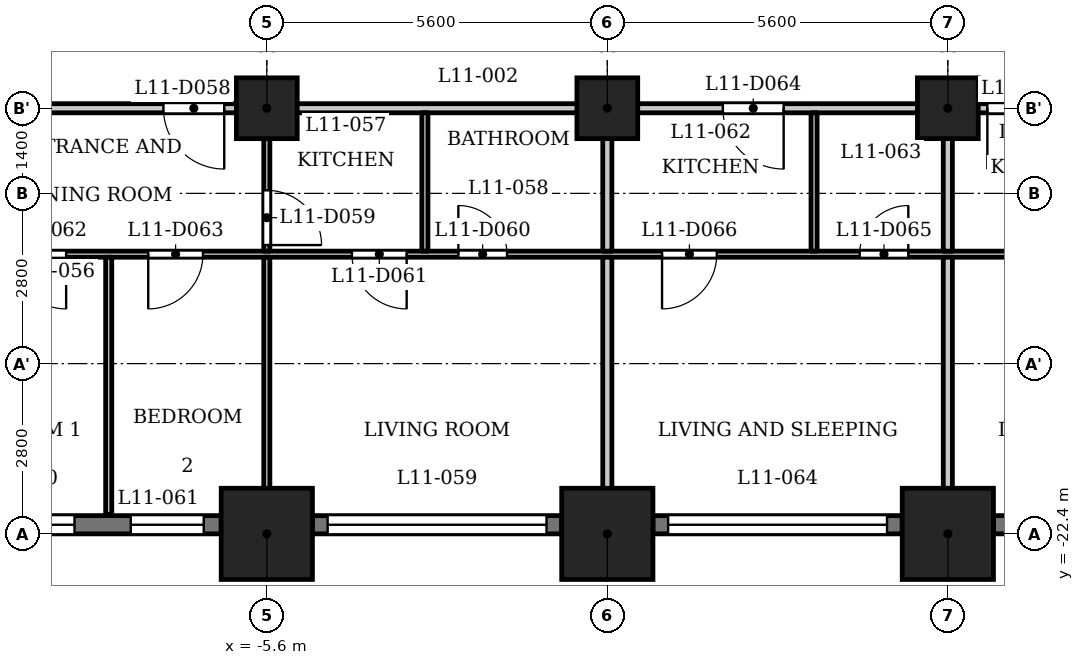
"""IFC4 building model, lengths in metres.
Left out: names, types, materials, properties, quantities, classifications, styles, units other than length and angle.
Written with IfcOpenShell. Run it as: python <this file> out.ifc"""

import sys

from ifc_helpers import new_model, si_unit, direction, frame, frame_2d, origin, origin_2d, place, context, subcontext, project, spatial, rectangle, extrude, element, fill, save


model = new_model("IFC4")
c1 = context("Model", 3, precision=1e-05, world=origin(), true_north=direction((0.0, 1.0)))
c2 = subcontext(c1, "Body", "Model", "MODEL_VIEW")
j1 = project(units=[si_unit("LENGTHUNIT", "METRE"), si_unit("PLANEANGLEUNIT", "RADIAN")], contexts=[c1])
p1 = place(None, origin())
s1 = spatial("IfcSite", under=j1, at=p1, CompositionType="ELEMENT")
p2 = place(p1, origin())
s2 = spatial("IfcBuilding", under=s1, at=p2, CompositionType="ELEMENT")
p3 = place(p2, frame((0.0, 0.0, 48.0)))
s3 = spatial("IfcBuildingStorey", under=s2, at=p3, CompositionType="ELEMENT", Elevation=48.0)
for number, where, z_axis, x_axis in (
    (1, (-5.6, -22.4, 0.0), (0.0, 0.0, 1.0), (1.0, 0.0, 0.0)),
    (2, (0.0, -22.4, 0.0), (0.0, 0.0, 1.0), (1.0, 0.0, 0.0)),
    (3, (5.6, -22.4, 0.0), (0.0, 0.0, 1.0), (1.0, 0.0, 0.0)),
):
    element("IfcColumn", number, at=place(p3, frame(where, z_axis=z_axis, x_axis=x_axis)), inside=s3, PredefinedType="COLUMN", context=c2, shape_type="SweptSolid", body=[
        extrude(rectangle(XDim=1.5, YDim=1.5, at=origin_2d()), origin(), (0.0, 0.0, 1.0), 3.5),
    ])
for number, where, z_axis, x_axis in (
    (4, (-5.6, -15.4, 0.0), (0.0, 0.0, 1.0), (1.0, 0.0, 0.0)),
    (5, (0.0, -15.4, 0.0), (0.0, 0.0, 1.0), (1.0, 0.0, 0.0)),
    (6, (5.6, -15.4, 0.0), (0.0, 0.0, 1.0), (1.0, 0.0, 0.0)),
):
    element("IfcColumn", number, at=place(p3, frame(where, z_axis=z_axis, x_axis=x_axis)), inside=s3, PredefinedType="COLUMN", context=c2, shape_type="SweptSolid", body=[
        extrude(rectangle(XDim=1.0, YDim=1.0, at=origin_2d()), origin(), (0.0, 0.0, 1.0), 3.5),
    ])
p4 = place(p3, frame((-10.45, -22.25, 0.0), z_axis=(0.0, 0.0, 1.0), x_axis=(1.0, 0.0, 0.0)))
e7 = element("IfcWall", 7, at=p4, inside=s3, PredefinedType="SOLIDWALL", context=c2, shape_type="SweptSolid", body=[
    extrude(rectangle(XDim=4.1, YDim=0.3, at=frame_2d((2.05, 0.0))), origin(), (0.0, 0.0, 1.0), 2.35),
])
p5 = place(p4, frame((0.488, 0.0, 0.6)))
e8 = element("IfcOpeningElement", 8, at=p5, cuts=e7, PredefinedType="OPENING", context=c2, shape_type="SweptSolid", body=[
    extrude(rectangle(XDim=1.2, YDim=1.55, at=frame_2d((0.6, 0.775))), frame((0.0, 0.16, 0.0), z_axis=(0.0, -1.0, 0.0), x_axis=(1.0, 0.0, 0.0)), (0.0, 0.0, 1.0), 0.32),
])
p6 = place(p4, frame((2.613, 0.0, 0.6)))
e9 = element("IfcOpeningElement", 9, at=p6, cuts=e7, PredefinedType="OPENING", context=c2, shape_type="SweptSolid", body=[
    extrude(rectangle(XDim=1.2, YDim=1.55, at=frame_2d((0.6, 0.775))), frame((0.0, 0.16, 0.0), z_axis=(0.0, -1.0, 0.0), x_axis=(1.0, 0.0, 0.0)), (0.0, 0.0, 1.0), 0.32),
])
p7 = place(p3, frame((-4.85, -22.25, 0.0), z_axis=(0.0, 0.0, 1.0), x_axis=(1.0, 0.0, 0.0)))
e10 = element("IfcWall", 10, at=p7, inside=s3, PredefinedType="SOLIDWALL", context=c2, shape_type="SweptSolid", body=[
    extrude(rectangle(XDim=4.1, YDim=0.3, at=frame_2d((2.05, 0.0))), origin(), (0.0, 0.0, 1.0), 2.35),
])
p8 = place(p7, frame((0.25, 0.0, 1.2)))
e11 = element("IfcOpeningElement", 11, at=p8, cuts=e10, PredefinedType="OPENING", context=c2, shape_type="SweptSolid", body=[
    extrude(rectangle(XDim=3.6, YDim=0.95, at=frame_2d((1.8, 0.475))), frame((0.0, 0.16, 0.0), z_axis=(0.0, -1.0, 0.0), x_axis=(1.0, 0.0, 0.0)), (0.0, 0.0, 1.0), 0.32),
])
p9 = place(p3, frame((0.75, -22.25, 0.0), z_axis=(0.0, 0.0, 1.0), x_axis=(1.0, 0.0, 0.0)))
e12 = element("IfcWall", 12, at=p9, inside=s3, PredefinedType="SOLIDWALL", context=c2, shape_type="SweptSolid", body=[
    extrude(rectangle(XDim=4.1, YDim=0.3, at=frame_2d((2.05, 0.0))), origin(), (0.0, 0.0, 1.0), 2.35),
])
p10 = place(p9, frame((0.25, 0.0, 1.2)))
e13 = element("IfcOpeningElement", 13, at=p10, cuts=e12, PredefinedType="OPENING", context=c2, shape_type="SweptSolid", body=[
    extrude(rectangle(XDim=3.6, YDim=0.95, at=frame_2d((1.8, 0.475))), frame((0.0, 0.16, 0.0), z_axis=(0.0, -1.0, 0.0), x_axis=(1.0, 0.0, 0.0)), (0.0, 0.0, 1.0), 0.32),
])
p11 = place(p3, frame((6.35, -22.25, 0.0), z_axis=(0.0, 0.0, 1.0), x_axis=(1.0, 0.0, 0.0)))
e14 = element("IfcWall", 14, at=p11, inside=s3, PredefinedType="SOLIDWALL", context=c2, shape_type="SweptSolid", body=[
    extrude(rectangle(XDim=4.1, YDim=0.3, at=frame_2d((2.05, 0.0))), origin(), (0.0, 0.0, 1.0), 2.35),
])
p12 = place(p11, frame((0.75, 0.0, 0.9)))
e15 = element("IfcOpeningElement", 15, at=p12, cuts=e14, PredefinedType="OPENING", context=c2, shape_type="SweptSolid", body=[
    extrude(rectangle(XDim=2.6, YDim=1.25, at=frame_2d((1.3, 0.625))), frame((0.0, 0.16, 0.0), z_axis=(0.0, -1.0, 0.0), x_axis=(1.0, 0.0, 0.0)), (0.0, 0.0, 1.0), 0.32),
])
p13 = place(p3, frame((-26.394, -17.8, 0.0), z_axis=(0.0, 0.0, 1.0), x_axis=(1.0, 0.0, 0.0)))
e16 = element("IfcWall", 16, at=p13, inside=s3, PredefinedType="PARTITIONING", context=c2, shape_type="SweptSolid", body=[
    extrude(rectangle(XDim=53.126, YDim=0.1, at=frame_2d((26.563, 0.0))), origin(), (0.0, 0.0, 1.0), 3.2),
])
p14 = place(p13, frame((0.794, 0.0, 0.0)))
e17 = element("IfcOpeningElement", 17, at=p14, cuts=e16, PredefinedType="OPENING", context=c2, shape_type="SweptSolid", body=[
    extrude(rectangle(XDim=0.8, YDim=2.1, at=frame_2d((0.4, 1.05))), frame((0.0, 0.06, 0.0), z_axis=(0.0, -1.0, 0.0), x_axis=(1.0, 0.0, 0.0)), (0.0, 0.0, 1.0), 0.12),
])
p15 = place(p13, frame((5.644, 0.0, 0.0)))
e18 = element("IfcOpeningElement", 18, at=p15, cuts=e16, PredefinedType="OPENING", context=c2, shape_type="SweptSolid", body=[
    extrude(rectangle(XDim=0.9, YDim=2.1, at=frame_2d((0.45, 1.05))), frame((0.0, 0.06, 0.0), z_axis=(0.0, -1.0, 0.0), x_axis=(1.0, 0.0, 0.0)), (0.0, 0.0, 1.0), 0.12),
])
p16 = place(p13, frame((10.394, 0.0, 0.0)))
e19 = element("IfcOpeningElement", 19, at=p16, cuts=e16, PredefinedType="OPENING", context=c2, shape_type="SweptSolid", body=[
    extrude(rectangle(XDim=0.8, YDim=2.1, at=frame_2d((0.4, 1.05))), frame((0.0, 0.06, 0.0), z_axis=(0.0, -1.0, 0.0), x_axis=(1.0, 0.0, 0.0)), (0.0, 0.0, 1.0), 0.12),
])
p17 = place(p13, frame((13.244, 0.0, 0.0)))
e20 = element("IfcOpeningElement", 20, at=p17, cuts=e16, PredefinedType="OPENING", context=c2, shape_type="SweptSolid", body=[
    extrude(rectangle(XDim=0.9, YDim=2.1, at=frame_2d((0.45, 1.05))), frame((0.0, 0.06, 0.0), z_axis=(0.0, -1.0, 0.0), x_axis=(1.0, 0.0, 0.0)), (0.0, 0.0, 1.0), 0.12),
])
p18 = place(p13, frame((23.944, 0.0, 0.0)))
e21 = element("IfcOpeningElement", 21, at=p18, cuts=e16, PredefinedType="OPENING", context=c2, shape_type="SweptSolid", body=[
    extrude(rectangle(XDim=0.8, YDim=2.1, at=frame_2d((0.4, 1.05))), frame((0.0, 0.06, 0.0), z_axis=(0.0, -1.0, 0.0), x_axis=(1.0, 0.0, 0.0)), (0.0, 0.0, 1.0), 0.12),
])
p19 = place(p13, frame((22.194, 0.0, 0.0)))
e22 = element("IfcOpeningElement", 22, at=p19, cuts=e16, PredefinedType="OPENING", context=c2, shape_type="SweptSolid", body=[
    extrude(rectangle(XDim=0.9, YDim=2.1, at=frame_2d((0.45, 1.05))), frame((0.0, 0.06, 0.0), z_axis=(0.0, -1.0, 0.0), x_axis=(1.0, 0.0, 0.0)), (0.0, 0.0, 1.0), 0.12),
])
p20 = place(p13, frame((16.594, 0.0, 0.0)))
e23 = element("IfcOpeningElement", 23, at=p20, cuts=e16, PredefinedType="OPENING", context=c2, shape_type="SweptSolid", body=[
    extrude(rectangle(XDim=0.9, YDim=2.1, at=frame_2d((0.45, 1.05))), frame((0.0, 0.06, 0.0), z_axis=(0.0, -1.0, 0.0), x_axis=(1.0, 0.0, 0.0)), (0.0, 0.0, 1.0), 0.12),
])
p21 = place(p13, frame((18.844, 0.0, 0.0)))
e24 = element("IfcOpeningElement", 24, at=p21, cuts=e16, PredefinedType="OPENING", context=c2, shape_type="SweptSolid", body=[
    extrude(rectangle(XDim=0.9, YDim=2.1, at=frame_2d((0.45, 1.05))), frame((0.0, 0.06, 0.0), z_axis=(0.0, -1.0, 0.0), x_axis=(1.0, 0.0, 0.0)), (0.0, 0.0, 1.0), 0.12),
])
p22 = place(p13, frame((30.544, 0.0, 0.0)))
e25 = element("IfcOpeningElement", 25, at=p22, cuts=e16, PredefinedType="OPENING", context=c2, shape_type="SweptSolid", body=[
    extrude(rectangle(XDim=0.8, YDim=2.1, at=frame_2d((0.4, 1.05))), frame((0.0, 0.06, 0.0), z_axis=(0.0, -1.0, 0.0), x_axis=(1.0, 0.0, 0.0)), (0.0, 0.0, 1.0), 0.12),
])
p23 = place(p13, frame((27.294, 0.0, 0.0)))
e26 = element("IfcOpeningElement", 26, at=p23, cuts=e16, PredefinedType="OPENING", context=c2, shape_type="SweptSolid", body=[
    extrude(rectangle(XDim=0.9, YDim=2.1, at=frame_2d((0.45, 1.05))), frame((0.0, 0.06, 0.0), z_axis=(0.0, -1.0, 0.0), x_axis=(1.0, 0.0, 0.0)), (0.0, 0.0, 1.0), 0.12),
])
p24 = place(p13, frame((35.894, 0.0, 0.0)))
e27 = element("IfcOpeningElement", 27, at=p24, cuts=e16, PredefinedType="OPENING", context=c2, shape_type="SweptSolid", body=[
    extrude(rectangle(XDim=0.8, YDim=2.1, at=frame_2d((0.4, 1.05))), frame((0.0, 0.06, 0.0), z_axis=(0.0, -1.0, 0.0), x_axis=(1.0, 0.0, 0.0)), (0.0, 0.0, 1.0), 0.12),
])
p25 = place(p13, frame((33.644, 0.0, 0.0)))
e28 = element("IfcOpeningElement", 28, at=p25, cuts=e16, PredefinedType="OPENING", context=c2, shape_type="SweptSolid", body=[
    extrude(rectangle(XDim=0.9, YDim=2.1, at=frame_2d((0.45, 1.05))), frame((0.0, 0.06, 0.0), z_axis=(0.0, -1.0, 0.0), x_axis=(1.0, 0.0, 0.0)), (0.0, 0.0, 1.0), 0.12),
])
p26 = place(p13, frame((41.494, 0.0, 0.0)))
e29 = element("IfcOpeningElement", 29, at=p26, cuts=e16, PredefinedType="OPENING", context=c2, shape_type="SweptSolid", body=[
    extrude(rectangle(XDim=0.8, YDim=2.1, at=frame_2d((0.4, 1.05))), frame((0.0, 0.06, 0.0), z_axis=(0.0, -1.0, 0.0), x_axis=(1.0, 0.0, 0.0)), (0.0, 0.0, 1.0), 0.12),
])
p27 = place(p13, frame((38.744, 0.0, 0.0)))
e30 = element("IfcOpeningElement", 30, at=p27, cuts=e16, PredefinedType="OPENING", context=c2, shape_type="SweptSolid", body=[
    extrude(rectangle(XDim=0.9, YDim=2.1, at=frame_2d((0.45, 1.05))), frame((0.0, 0.06, 0.0), z_axis=(0.0, -1.0, 0.0), x_axis=(1.0, 0.0, 0.0)), (0.0, 0.0, 1.0), 0.12),
])
p28 = place(p13, frame((49.362, 0.0, 0.0)))
e31 = element("IfcOpeningElement", 31, at=p28, cuts=e16, PredefinedType="OPENING", context=c2, shape_type="SweptSolid", body=[
    extrude(rectangle(XDim=0.8, YDim=2.1, at=frame_2d((0.4, 1.05))), frame((0.0, 0.06, 0.0), z_axis=(0.0, -1.0, 0.0), x_axis=(1.0, 0.0, 0.0)), (0.0, 0.0, 1.0), 0.12),
])
p29 = place(p13, frame((45.094, 0.0, 0.0)))
e32 = element("IfcOpeningElement", 32, at=p29, cuts=e16, PredefinedType="OPENING", context=c2, shape_type="SweptSolid", body=[
    extrude(rectangle(XDim=0.9, YDim=2.1, at=frame_2d((0.45, 1.05))), frame((0.0, 0.06, 0.0), z_axis=(0.0, -1.0, 0.0), x_axis=(1.0, 0.0, 0.0)), (0.0, 0.0, 1.0), 0.12),
])
p30 = place(p3, frame((-27.484, -15.4, 0.0), z_axis=(0.0, 0.0, 1.0), x_axis=(1.0, 0.0, 0.0)))
e33 = element("IfcWall", 33, at=p30, inside=s3, PredefinedType="PARTITIONING", context=c2, shape_type="SweptSolid", body=[
    extrude(rectangle(XDim=54.968, YDim=0.15, at=frame_2d((27.484, 0.0))), origin(), (0.0, 0.0, 1.0), 3.2),
])
p31 = place(p30, frame((5.734, 0.0, 0.0)))
e34 = element("IfcOpeningElement", 34, at=p31, cuts=e33, PredefinedType="OPENING", context=c2, shape_type="SweptSolid", body=[
    extrude(rectangle(XDim=1.0, YDim=2.1, at=frame_2d((0.5, 1.05))), frame((0.0, 0.085, 0.0), z_axis=(0.0, -1.0, 0.0), x_axis=(1.0, 0.0, 0.0)), (0.0, 0.0, 1.0), 0.17),
])
p32 = place(p30, frame((13.334, 0.0, 0.0)))
e35 = element("IfcOpeningElement", 35, at=p32, cuts=e33, PredefinedType="OPENING", context=c2, shape_type="SweptSolid", body=[
    extrude(rectangle(XDim=1.0, YDim=2.1, at=frame_2d((0.5, 1.05))), frame((0.0, 0.085, 0.0), z_axis=(0.0, -1.0, 0.0), x_axis=(1.0, 0.0, 0.0)), (0.0, 0.0, 1.0), 0.17),
])
p33 = place(p30, frame((20.184, 0.0, 0.0)))
e36 = element("IfcOpeningElement", 36, at=p33, cuts=e33, PredefinedType="OPENING", context=c2, shape_type="SweptSolid", body=[
    extrude(rectangle(XDim=1.0, YDim=2.1, at=frame_2d((0.5, 1.05))), frame((0.0, 0.085, 0.0), z_axis=(0.0, -1.0, 0.0), x_axis=(1.0, 0.0, 0.0)), (0.0, 0.0, 1.0), 0.17),
])
p34 = place(p30, frame((29.384, 0.0, 0.0)))
e37 = element("IfcOpeningElement", 37, at=p34, cuts=e33, PredefinedType="OPENING", context=c2, shape_type="SweptSolid", body=[
    extrude(rectangle(XDim=1.0, YDim=2.1, at=frame_2d((0.5, 1.05))), frame((0.0, 0.085, 0.0), z_axis=(0.0, -1.0, 0.0), x_axis=(1.0, 0.0, 0.0)), (0.0, 0.0, 1.0), 0.17),
])
p35 = place(p30, frame((33.734, 0.0, 0.0)))
e38 = element("IfcOpeningElement", 38, at=p35, cuts=e33, PredefinedType="OPENING", context=c2, shape_type="SweptSolid", body=[
    extrude(rectangle(XDim=1.0, YDim=2.1, at=frame_2d((0.5, 1.05))), frame((0.0, 0.085, 0.0), z_axis=(0.0, -1.0, 0.0), x_axis=(1.0, 0.0, 0.0)), (0.0, 0.0, 1.0), 0.17),
])
p36 = place(p30, frame((39.584, 0.0, 0.0)))
e39 = element("IfcOpeningElement", 39, at=p36, cuts=e33, PredefinedType="OPENING", context=c2, shape_type="SweptSolid", body=[
    extrude(rectangle(XDim=1.0, YDim=2.1, at=frame_2d((0.5, 1.05))), frame((0.0, 0.085, 0.0), z_axis=(0.0, -1.0, 0.0), x_axis=(1.0, 0.0, 0.0)), (0.0, 0.0, 1.0), 0.17),
])
p37 = place(p30, frame((45.184, 0.0, 0.0)))
e40 = element("IfcOpeningElement", 40, at=p37, cuts=e33, PredefinedType="OPENING", context=c2, shape_type="SweptSolid", body=[
    extrude(rectangle(XDim=1.0, YDim=2.1, at=frame_2d((0.5, 1.05))), frame((0.0, 0.085, 0.0), z_axis=(0.0, -1.0, 0.0), x_axis=(1.0, 0.0, 0.0)), (0.0, 0.0, 1.0), 0.17),
])
p38 = place(p3, frame((-8.2, -22.08, 0.0), z_axis=(0.0, 0.0, 1.0), x_axis=(0.0, 1.0, 0.0)))
e41 = element("IfcWall", 41, at=p38, inside=s3, PredefinedType="PARTITIONING", context=c2, shape_type="SweptSolid", body=[
    extrude(rectangle(XDim=4.23, YDim=0.1, at=frame_2d((2.115, 0.0))), origin(), (0.0, 0.0, 1.0), 3.2),
])
p39 = place(p3, frame((-5.6, -23.13, 0.0), z_axis=(0.0, 0.0, 1.0), x_axis=(0.0, 1.0, 0.0)))
e42 = element("IfcWall", 42, at=p39, inside=s3, PredefinedType="PARTITIONING", context=c2, shape_type="SweptSolid", body=[
    extrude(rectangle(XDim=5.28, YDim=0.1, at=frame_2d((2.64, 0.0))), origin(), (0.0, 0.0, 1.0), 3.2),
])
p40 = place(p3, frame((-5.6, -17.75, 0.0), z_axis=(0.0, 0.0, 1.0), x_axis=(0.0, 1.0, 0.0)))
e43 = element("IfcWall", 43, at=p40, inside=s3, PredefinedType="PARTITIONING", context=c2, shape_type="SweptSolid", body=[
    extrude(rectangle(XDim=2.275, YDim=0.1, at=frame_2d((1.137, 0.0))), origin(), (0.0, 0.0, 1.0), 3.2),
])
p41 = place(p40, frame((0.1, 0.0, 0.0)))
e44 = element("IfcOpeningElement", 44, at=p41, cuts=e43, PredefinedType="OPENING", context=c2, shape_type="SweptSolid", body=[
    extrude(rectangle(XDim=0.9, YDim=2.1, at=frame_2d((0.45, 1.05))), frame((0.0, 0.06, 0.0), z_axis=(0.0, -1.0, 0.0), x_axis=(1.0, 0.0, 0.0)), (0.0, 0.0, 1.0), 0.12),
])
p42 = place(p3, frame((-3.0, -17.75, 0.0), z_axis=(0.0, 0.0, 1.0), x_axis=(0.0, 1.0, 0.0)))
e45 = element("IfcWall", 45, at=p42, inside=s3, PredefinedType="PARTITIONING", context=c2, shape_type="SweptSolid", body=[
    extrude(rectangle(XDim=2.275, YDim=0.1, at=frame_2d((1.137, 0.0))), origin(), (0.0, 0.0, 1.0), 3.2),
])
p43 = place(p3, frame((0.0, -23.13, 0.0), z_axis=(0.0, 0.0, 1.0), x_axis=(0.0, 1.0, 0.0)))
e46 = element("IfcWall", 46, at=p43, inside=s3, PredefinedType="PARTITIONING", context=c2, shape_type="SweptSolid", body=[
    extrude(rectangle(XDim=5.28, YDim=0.15, at=frame_2d((2.64, 0.0))), origin(), (0.0, 0.0, 1.0), 3.2),
])
p44 = place(p3, frame((0.0, -17.75, 0.0), z_axis=(0.0, 0.0, 1.0), x_axis=(0.0, 1.0, 0.0)))
e47 = element("IfcWall", 47, at=p44, inside=s3, PredefinedType="PARTITIONING", context=c2, shape_type="SweptSolid", body=[
    extrude(rectangle(XDim=2.275, YDim=0.15, at=frame_2d((1.137, 0.0))), origin(), (0.0, 0.0, 1.0), 3.2),
])
p45 = place(p3, frame((3.4, -17.75, 0.0), z_axis=(0.0, 0.0, 1.0), x_axis=(0.0, 1.0, 0.0)))
e48 = element("IfcWall", 48, at=p45, inside=s3, PredefinedType="PARTITIONING", context=c2, shape_type="SweptSolid", body=[
    extrude(rectangle(XDim=2.275, YDim=0.1, at=frame_2d((1.137, 0.0))), origin(), (0.0, 0.0, 1.0), 3.2),
])
p46 = place(p3, frame((5.6, -23.13, 0.0), z_axis=(0.0, 0.0, 1.0), x_axis=(0.0, 1.0, 0.0)))
e49 = element("IfcWall", 49, at=p46, inside=s3, PredefinedType="PARTITIONING", context=c2, shape_type="SweptSolid", body=[
    extrude(rectangle(XDim=5.28, YDim=0.15, at=frame_2d((2.64, 0.0))), origin(), (0.0, 0.0, 1.0), 3.2),
])
p47 = place(p3, frame((5.6, -17.75, 0.0), z_axis=(0.0, 0.0, 1.0), x_axis=(0.0, 1.0, 0.0)))
e50 = element("IfcWall", 50, at=p47, inside=s3, PredefinedType="PARTITIONING", context=c2, shape_type="SweptSolid", body=[
    extrude(rectangle(XDim=2.275, YDim=0.15, at=frame_2d((1.137, 0.0))), origin(), (0.0, 0.0, 1.0), 3.2),
])
p48 = place(p33, origin())
e51 = element("IfcDoor", 51, at=p48, inside=s3, OperationType="SINGLE_SWING_RIGHT", PredefinedType="DOOR", context=c2, shape_type="SweptSolid", body=[
    extrude(rectangle(XDim=1.0, YDim=2.1, at=frame_2d((0.5, 1.05))), frame((0.0, 0.025, 0.0), z_axis=(0.0, -1.0, 0.0), x_axis=(1.0, 0.0, 0.0)), (0.0, 0.0, 1.0), 0.05),
])
fill(e36, e51)
p49 = place(p41, origin())
e52 = element("IfcDoor", 52, at=p49, inside=s3, OperationType="SINGLE_SWING_LEFT", PredefinedType="DOOR", context=c2, shape_type="SweptSolid", body=[
    extrude(rectangle(XDim=0.9, YDim=2.1, at=frame_2d((0.45, 1.05))), frame((0.0, 0.025, 0.0), z_axis=(0.0, -1.0, 0.0), x_axis=(1.0, 0.0, 0.0)), (0.0, 0.0, 1.0), 0.05),
])
fill(e44, e52)
p50 = place(p18, origin())
e53 = element("IfcDoor", 53, at=p50, inside=s3, OperationType="SINGLE_SWING_RIGHT", PredefinedType="DOOR", context=c2, shape_type="SweptSolid", body=[
    extrude(rectangle(XDim=0.8, YDim=2.1, at=frame_2d((0.4, 1.05))), frame((0.0, 0.025, 0.0), z_axis=(0.0, -1.0, 0.0), x_axis=(1.0, 0.0, 0.0)), (0.0, 0.0, 1.0), 0.05),
])
fill(e21, e53)
p51 = place(p19, origin())
e54 = element("IfcDoor", 54, at=p51, inside=s3, OperationType="SINGLE_SWING_RIGHT", PredefinedType="DOOR", context=c2, shape_type="SweptSolid", body=[
    extrude(rectangle(XDim=0.9, YDim=2.1, at=frame_2d((0.45, 1.05))), frame((0.0, 0.025, 0.0), z_axis=(0.0, -1.0, 0.0), x_axis=(1.0, 0.0, 0.0)), (0.0, 0.0, 1.0), 0.05),
])
fill(e22, e54)
p52 = place(p20, origin())
e55 = element("IfcDoor", 55, at=p52, inside=s3, OperationType="SINGLE_SWING_RIGHT", PredefinedType="DOOR", context=c2, shape_type="SweptSolid", body=[
    extrude(rectangle(XDim=0.9, YDim=2.1, at=frame_2d((0.45, 1.05))), frame((0.0, 0.025, 0.0), z_axis=(0.0, -1.0, 0.0), x_axis=(1.0, 0.0, 0.0)), (0.0, 0.0, 1.0), 0.05),
])
fill(e23, e55)
p53 = place(p21, origin())
e56 = element("IfcDoor", 56, at=p53, inside=s3, OperationType="SINGLE_SWING_LEFT", PredefinedType="DOOR", context=c2, shape_type="SweptSolid", body=[
    extrude(rectangle(XDim=0.9, YDim=2.1, at=frame_2d((0.45, 1.05))), frame((0.0, 0.025, 0.0), z_axis=(0.0, -1.0, 0.0), x_axis=(1.0, 0.0, 0.0)), (0.0, 0.0, 1.0), 0.05),
])
fill(e24, e56)
p54 = place(p34, origin())
e57 = element("IfcDoor", 57, at=p54, inside=s3, OperationType="SINGLE_SWING_RIGHT", PredefinedType="DOOR", context=c2, shape_type="SweptSolid", body=[
    extrude(rectangle(XDim=1.0, YDim=2.1, at=frame_2d((0.5, 1.05))), frame((0.0, 0.025, 0.0), z_axis=(0.0, -1.0, 0.0), x_axis=(1.0, 0.0, 0.0)), (0.0, 0.0, 1.0), 0.05),
])
fill(e37, e57)
p55 = place(p22, origin())
e58 = element("IfcDoor", 58, at=p55, inside=s3, OperationType="SINGLE_SWING_LEFT", PredefinedType="DOOR", context=c2, shape_type="SweptSolid", body=[
    extrude(rectangle(XDim=0.8, YDim=2.1, at=frame_2d((0.4, 1.05))), frame((0.0, 0.025, 0.0), z_axis=(0.0, -1.0, 0.0), x_axis=(1.0, 0.0, 0.0)), (0.0, 0.0, 1.0), 0.05),
])
fill(e25, e58)
p56 = place(p23, origin())
e59 = element("IfcDoor", 59, at=p56, inside=s3, OperationType="SINGLE_SWING_LEFT", PredefinedType="DOOR", context=c2, shape_type="SweptSolid", body=[
    extrude(rectangle(XDim=0.9, YDim=2.1, at=frame_2d((0.45, 1.05))), frame((0.0, 0.025, 0.0), z_axis=(0.0, -1.0, 0.0), x_axis=(1.0, 0.0, 0.0)), (0.0, 0.0, 1.0), 0.05),
])
fill(e26, e59)
p57 = place(p35, origin())
e60 = element("IfcDoor", 60, at=p57, inside=s3, OperationType="SINGLE_SWING_LEFT", PredefinedType="DOOR", context=c2, shape_type="SweptSolid", body=[
    extrude(rectangle(XDim=1.0, YDim=2.1, at=frame_2d((0.5, 1.05))), frame((0.0, 0.025, 0.0), z_axis=(0.0, -1.0, 0.0), x_axis=(1.0, 0.0, 0.0)), (0.0, 0.0, 1.0), 0.05),
])
fill(e38, e60)
p58 = place(p5, origin())
e61 = element("IfcWindow", 61, at=p58, inside=s3, PartitioningType="SINGLE_PANEL", PredefinedType="WINDOW", context=c2, shape_type="SweptSolid", body=[
    extrude(rectangle(XDim=1.2, YDim=1.55, at=frame_2d((0.6, 0.775))), frame((0.0, 0.03, 0.0), z_axis=(0.0, -1.0, 0.0), x_axis=(1.0, 0.0, 0.0)), (0.0, 0.0, 1.0), 0.06),
])
fill(e8, e61)
p59 = place(p6, origin())
e62 = element("IfcWindow", 62, at=p59, inside=s3, PartitioningType="SINGLE_PANEL", PredefinedType="WINDOW", context=c2, shape_type="SweptSolid", body=[
    extrude(rectangle(XDim=1.2, YDim=1.55, at=frame_2d((0.6, 0.775))), frame((0.0, 0.03, 0.0), z_axis=(0.0, -1.0, 0.0), x_axis=(1.0, 0.0, 0.0)), (0.0, 0.0, 1.0), 0.06),
])
fill(e9, e62)
p60 = place(p8, origin())
e63 = element("IfcWindow", 63, at=p60, inside=s3, PartitioningType="SINGLE_PANEL", PredefinedType="WINDOW", context=c2, shape_type="SweptSolid", body=[
    extrude(rectangle(XDim=3.6, YDim=0.95, at=frame_2d((1.8, 0.475))), frame((0.0, 0.03, 0.0), z_axis=(0.0, -1.0, 0.0), x_axis=(1.0, 0.0, 0.0)), (0.0, 0.0, 1.0), 0.06),
])
fill(e11, e63)
p61 = place(p10, origin())
e64 = element("IfcWindow", 64, at=p61, inside=s3, PartitioningType="SINGLE_PANEL", PredefinedType="WINDOW", context=c2, shape_type="SweptSolid", body=[
    extrude(rectangle(XDim=3.6, YDim=0.95, at=frame_2d((1.8, 0.475))), frame((0.0, 0.03, 0.0), z_axis=(0.0, -1.0, 0.0), x_axis=(1.0, 0.0, 0.0)), (0.0, 0.0, 1.0), 0.06),
])
fill(e13, e64)
save(model, sys.argv[1])
